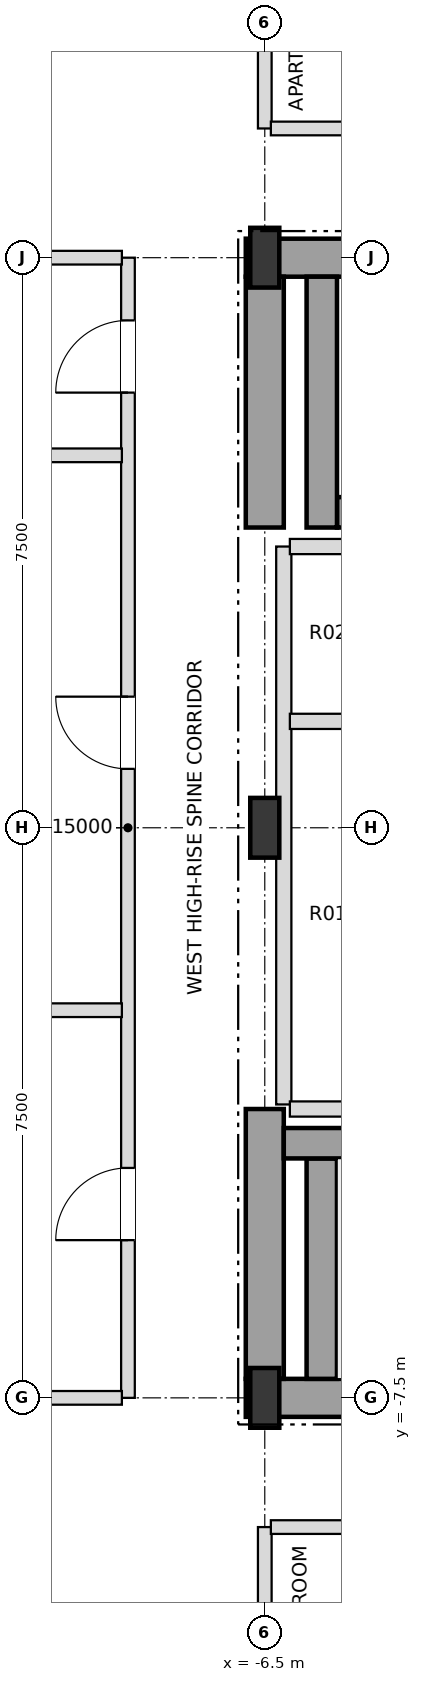
"""IFC4 building model, lengths in metres.
Left out: names, types, materials, properties, quantities, classifications, styles, units other than length and angle.
Written with IfcOpenShell. Run it as: python <this file> out.ifc"""

import sys

from ifc_helpers import new_model, si_unit, direction, frame, frame_2d, origin, origin_2d, place, context, subcontext, project, spatial, rectangle, i_section, extrude, element, fill, save


model = new_model("IFC4")
c1 = context("Model", 3, precision=1e-05, world=origin(), true_north=direction((0.0, 1.0)))
c2 = subcontext(c1, "Body", "Model", "MODEL_VIEW")
j1 = project(units=[si_unit("LENGTHUNIT", "METRE"), si_unit("PLANEANGLEUNIT", "RADIAN")], contexts=[c1])
p1 = place(None, origin())
s1 = spatial("IfcSite", under=j1, at=p1, CompositionType="ELEMENT")
p2 = place(p1, origin())
s2 = spatial("IfcBuilding", under=s1, at=p2, CompositionType="ELEMENT")
p3 = place(p2, frame((0.0, 0.0, 233.1)))
s3 = spatial("IfcBuildingStorey", under=s2, at=p3, CompositionType="ELEMENT", Elevation=233.1)
for number, where, z_axis, x_axis in (
    (1, (-6.5, -7.5, 0.0), (0.0, 0.0, 1.0), (1.0, 0.0, 0.0)),
    (2, (-6.5, 0.0, 0.0), (0.0, 0.0, 1.0), (1.0, 0.0, 0.0)),
    (3, (-6.5, 7.5, 0.0), (0.0, 0.0, 1.0), (1.0, 0.0, 0.0)),
):
    element("IfcColumn", number, at=place(p3, frame(where, z_axis=z_axis, x_axis=x_axis)), inside=s3, PredefinedType="COLUMN", context=c2, shape_type="SweptSolid", body=[
        extrude(i_section(OverallWidth=0.382, OverallDepth=0.786, WebThickness=0.02, FlangeThickness=0.033, at=origin_2d()), origin(), (0.0, 0.0, 1.0), 3.6),
    ])
p4 = place(p3, frame((-6.75, -7.5, 0.0), z_axis=(0.0, 0.0, 1.0), x_axis=(1.0, 0.0, 0.0)))
e4 = element("IfcWall", 4, at=p4, inside=s3, PredefinedType="SHEAR", context=c2, shape_type="SweptSolid", body=[
    extrude(rectangle(XDim=6.75, YDim=0.5, at=frame_2d((3.375, 0.0))), origin(), (0.0, 0.0, 1.0), 3.38),
])
p5 = place(p3, frame((-6.75, 7.5, 0.0), z_axis=(0.0, 0.0, 1.0), x_axis=(1.0, 0.0, 0.0)))
e5 = element("IfcWall", 5, at=p5, inside=s3, PredefinedType="SHEAR", context=c2, shape_type="SweptSolid", body=[
    extrude(rectangle(XDim=6.75, YDim=0.5, at=frame_2d((3.375, 0.0))), origin(), (0.0, 0.0, 1.0), 3.38),
])
p6 = place(p5, frame((1.65, 0.0, 0.0)))
e6 = element("IfcOpeningElement", 6, at=p6, cuts=e5, PredefinedType="OPENING", context=c2, shape_type="SweptSolid", body=[
    extrude(rectangle(XDim=1.05, YDim=2.15, at=frame_2d((0.525, 1.075))), frame((0.0, 0.26, 0.0), z_axis=(0.0, -1.0, 0.0), x_axis=(1.0, 0.0, 0.0)), (0.0, 0.0, 1.0), 0.52),
])
p7 = place(p3, frame((-6.5, -7.25, 0.0), z_axis=(0.0, 0.0, 1.0), x_axis=(0.0, 1.0, 0.0)))
e7 = element("IfcWall", 7, at=p7, inside=s3, PredefinedType="SHEAR", context=c2, shape_type="SweptSolid", body=[
    extrude(rectangle(XDim=3.55, YDim=0.5, at=frame_2d((1.775, 0.0))), origin(), (0.0, 0.0, 1.0), 3.38),
])
p8 = place(p3, frame((-6.5, 3.95, 0.0), z_axis=(0.0, 0.0, 1.0), x_axis=(0.0, 1.0, 0.0)))
e8 = element("IfcWall", 8, at=p8, inside=s3, PredefinedType="SHEAR", context=c2, shape_type="SweptSolid", body=[
    extrude(rectangle(XDim=3.3, YDim=0.5, at=frame_2d((1.65, 0.0))), origin(), (0.0, 0.0, 1.0), 3.38),
])
p9 = place(p3, frame((-5.75, -7.25, 0.0), z_axis=(0.0, 0.0, 1.0), x_axis=(0.0, 1.0, 0.0)))
e9 = element("IfcWall", 9, at=p9, inside=s3, PredefinedType="SHEAR", context=c2, shape_type="SweptSolid", body=[
    extrude(rectangle(XDim=2.9, YDim=0.4, at=frame_2d((1.45, 0.0))), origin(), (0.0, 0.0, 1.0), 3.38),
])
p10 = place(p3, frame((-6.25, -4.15, 0.0), z_axis=(0.0, 0.0, 1.0), x_axis=(1.0, 0.0, 0.0)))
e10 = element("IfcWall", 10, at=p10, inside=s3, PredefinedType="SHEAR", context=c2, shape_type="SweptSolid", body=[
    extrude(rectangle(XDim=7.78, YDim=0.4, at=frame_2d((3.89, 0.0))), origin(), (0.0, 0.0, 1.0), 3.38),
])
p11 = place(p3, frame((-5.55, 4.15, 0.0), z_axis=(0.0, 0.0, 1.0), x_axis=(1.0, 0.0, 0.0)))
e11 = element("IfcWall", 11, at=p11, inside=s3, PredefinedType="SHEAR", context=c2, shape_type="SweptSolid", body=[
    extrude(rectangle(XDim=7.08, YDim=0.4, at=frame_2d((3.54, 0.0))), origin(), (0.0, 0.0, 1.0), 3.38),
])
p12 = place(p3, frame((-5.75, 3.95, 0.0), z_axis=(0.0, 0.0, 1.0), x_axis=(0.0, 1.0, 0.0)))
e12 = element("IfcWall", 12, at=p12, inside=s3, PredefinedType="SHEAR", context=c2, shape_type="SweptSolid", body=[
    extrude(rectangle(XDim=3.3, YDim=0.4, at=frame_2d((1.65, 0.0))), origin(), (0.0, 0.0, 1.0), 3.38),
])
p13 = place(p3, frame((-8.3, -7.5, 0.0), z_axis=(0.0, 0.0, 1.0), x_axis=(0.0, 1.0, 0.0)))
e13 = element("IfcWall", 13, at=p13, inside=s3, PredefinedType="PARTITIONING", context=c2, shape_type="SweptSolid", body=[
    extrude(rectangle(XDim=15.0, YDim=0.18, at=frame_2d((7.5, 0.0))), origin(), (0.0, 0.0, 1.0), 3.38),
])
p14 = place(p13, frame((2.075, 0.0, 0.0)))
e14 = element("IfcOpeningElement", 14, at=p14, cuts=e13, PredefinedType="OPENING", context=c2, shape_type="SweptSolid", body=[
    extrude(rectangle(XDim=0.95, YDim=2.15, at=frame_2d((0.475, 1.075))), frame((0.0, 0.1, 0.0), z_axis=(0.0, -1.0, 0.0), x_axis=(1.0, 0.0, 0.0)), (0.0, 0.0, 1.0), 0.2),
])
p15 = place(p13, frame((8.275, 0.0, 0.0)))
e15 = element("IfcOpeningElement", 15, at=p15, cuts=e13, PredefinedType="OPENING", context=c2, shape_type="SweptSolid", body=[
    extrude(rectangle(XDim=0.95, YDim=2.15, at=frame_2d((0.475, 1.075))), frame((0.0, 0.1, 0.0), z_axis=(0.0, -1.0, 0.0), x_axis=(1.0, 0.0, 0.0)), (0.0, 0.0, 1.0), 0.2),
])
p16 = place(p13, frame((13.225, 0.0, 0.0)))
e16 = element("IfcOpeningElement", 16, at=p16, cuts=e13, PredefinedType="OPENING", context=c2, shape_type="SweptSolid", body=[
    extrude(rectangle(XDim=0.95, YDim=2.15, at=frame_2d((0.475, 1.075))), frame((0.0, 0.1, 0.0), z_axis=(0.0, -1.0, 0.0), x_axis=(1.0, 0.0, 0.0)), (0.0, 0.0, 1.0), 0.2),
])
for number, where, z_axis, x_axis in (
    (17, (-6.5, -19.9, 0.0), (0.0, 0.0, 1.0), (0.0, 1.0, 0.0)),
    (18, (-6.5, 9.2, 0.0), (0.0, 0.0, 1.0), (0.0, 1.0, 0.0)),
):
    element("IfcWall", number, at=place(p3, frame(where, z_axis=z_axis, x_axis=x_axis)), inside=s3, PredefinedType="PARTITIONING", context=c2, shape_type="SweptSolid", body=[
        extrude(rectangle(XDim=10.7, YDim=0.18, at=frame_2d((5.35, 0.0))), origin(), (0.0, 0.0, 1.0), 2.826),
    ])
p17 = place(p3, frame((-6.25, -3.64, 0.0), z_axis=(0.0, 0.0, 1.0), x_axis=(0.0, 1.0, 0.0)))
e19 = element("IfcWall", 19, at=p17, inside=s3, PredefinedType="SOLIDWALL", context=c2, shape_type="SweptSolid", body=[
    extrude(rectangle(XDim=7.34, YDim=0.2, at=frame_2d((3.67, 0.0))), origin(), (0.0, 0.0, 1.0), 3.38),
])
p18 = place(p3, frame((-6.42, -9.2, 0.0), z_axis=(0.0, 0.0, 1.0), x_axis=(1.0, 0.0, 0.0)))
e20 = element("IfcWall", 20, at=p18, inside=s3, PredefinedType="PARTITIONING", context=c2, shape_type="SweptSolid", body=[
    extrude(rectangle(XDim=1.69, YDim=0.18, at=frame_2d((0.845, 0.0))), origin(), (0.0, 0.0, 1.0), 3.38),
])
p19 = place(p3, frame((-16.9, -7.5, 0.0), z_axis=(0.0, 0.0, 1.0), x_axis=(1.0, 0.0, 0.0)))
e21 = element("IfcWall", 21, at=p19, inside=s3, PredefinedType="PARTITIONING", context=c2, shape_type="SweptSolid", body=[
    extrude(rectangle(XDim=8.52, YDim=0.18, at=frame_2d((4.26, 0.0))), origin(), (0.0, 0.0, 1.0), 2.826),
])
p20 = place(p3, frame((-6.17, -3.7, 0.0), z_axis=(0.0, 0.0, 1.0), x_axis=(1.0, 0.0, 0.0)))
e22 = element("IfcWall", 22, at=p20, inside=s3, PredefinedType="SOLIDWALL", context=c2, shape_type="SweptSolid", body=[
    extrude(rectangle(XDim=1.94, YDim=0.2, at=frame_2d((0.97, 0.0))), origin(), (0.0, 0.0, 1.0), 3.38),
])
p21 = place(p3, frame((-16.82, -2.4, 0.0), z_axis=(0.0, 0.0, 1.0), x_axis=(1.0, 0.0, 0.0)))
e23 = element("IfcWall", 23, at=p21, inside=s3, PredefinedType="PARTITIONING", context=c2, shape_type="SweptSolid", body=[
    extrude(rectangle(XDim=8.44, YDim=0.18, at=frame_2d((4.22, 0.0))), origin(), (0.0, 0.0, 1.0), 3.018),
])
for number, where, z_axis, x_axis in (
    (24, (-6.17, 1.4, 0.0), (0.0, 0.0, 1.0), (1.0, 0.0, 0.0)),
    (25, (-6.17, 3.7, 0.0), (0.0, 0.0, 1.0), (1.0, 0.0, 0.0)),
):
    element("IfcWall", number, at=place(p3, frame(where, z_axis=z_axis, x_axis=x_axis)), inside=s3, PredefinedType="SOLIDWALL", context=c2, shape_type="SweptSolid", body=[
        extrude(rectangle(XDim=1.94, YDim=0.2, at=frame_2d((0.97, 0.0))), origin(), (0.0, 0.0, 1.0), 3.38),
    ])
p22 = place(p3, frame((-16.82, 4.9, 0.0), z_axis=(0.0, 0.0, 1.0), x_axis=(1.0, 0.0, 0.0)))
e26 = element("IfcWall", 26, at=p22, inside=s3, PredefinedType="PARTITIONING", context=c2, shape_type="SweptSolid", body=[
    extrude(rectangle(XDim=8.44, YDim=0.18, at=frame_2d((4.22, 0.0))), origin(), (0.0, 0.0, 1.0), 3.018),
])
p23 = place(p3, frame((-16.9, 7.5, 0.0), z_axis=(0.0, 0.0, 1.0), x_axis=(1.0, 0.0, 0.0)))
e27 = element("IfcWall", 27, at=p23, inside=s3, PredefinedType="PARTITIONING", context=c2, shape_type="SweptSolid", body=[
    extrude(rectangle(XDim=8.52, YDim=0.18, at=frame_2d((4.26, 0.0))), origin(), (0.0, 0.0, 1.0), 2.826),
])
p24 = place(p3, frame((-6.42, 9.2, 0.0), z_axis=(0.0, 0.0, 1.0), x_axis=(1.0, 0.0, 0.0)))
e28 = element("IfcWall", 28, at=p24, inside=s3, PredefinedType="PARTITIONING", context=c2, shape_type="SweptSolid", body=[
    extrude(rectangle(XDim=1.64, YDim=0.18, at=frame_2d((0.82, 0.0))), origin(), (0.0, 0.0, 1.0), 3.38),
])
p25 = place(p14, origin())
e29 = element("IfcDoor", 29, at=p25, inside=s3, OperationType="SINGLE_SWING_LEFT", PredefinedType="DOOR", context=c2, shape_type="SweptSolid", body=[
    extrude(rectangle(XDim=0.95, YDim=2.15, at=frame_2d((0.475, 1.075))), frame((0.0, 0.025, 0.0), z_axis=(0.0, -1.0, 0.0), x_axis=(1.0, 0.0, 0.0)), (0.0, 0.0, 1.0), 0.05),
])
fill(e14, e29)
p26 = place(p15, origin())
e30 = element("IfcDoor", 30, at=p26, inside=s3, OperationType="SINGLE_SWING_RIGHT", PredefinedType="DOOR", context=c2, shape_type="SweptSolid", body=[
    extrude(rectangle(XDim=0.95, YDim=2.15, at=frame_2d((0.475, 1.075))), frame((0.0, 0.025, 0.0), z_axis=(0.0, -1.0, 0.0), x_axis=(1.0, 0.0, 0.0)), (0.0, 0.0, 1.0), 0.05),
])
fill(e15, e30)
p27 = place(p16, origin())
e31 = element("IfcDoor", 31, at=p27, inside=s3, OperationType="SINGLE_SWING_LEFT", PredefinedType="DOOR", context=c2, shape_type="SweptSolid", body=[
    extrude(rectangle(XDim=0.95, YDim=2.15, at=frame_2d((0.475, 1.075))), frame((0.0, 0.025, 0.0), z_axis=(0.0, -1.0, 0.0), x_axis=(1.0, 0.0, 0.0)), (0.0, 0.0, 1.0), 0.05),
])
fill(e16, e31)
save(model, sys.argv[1])
